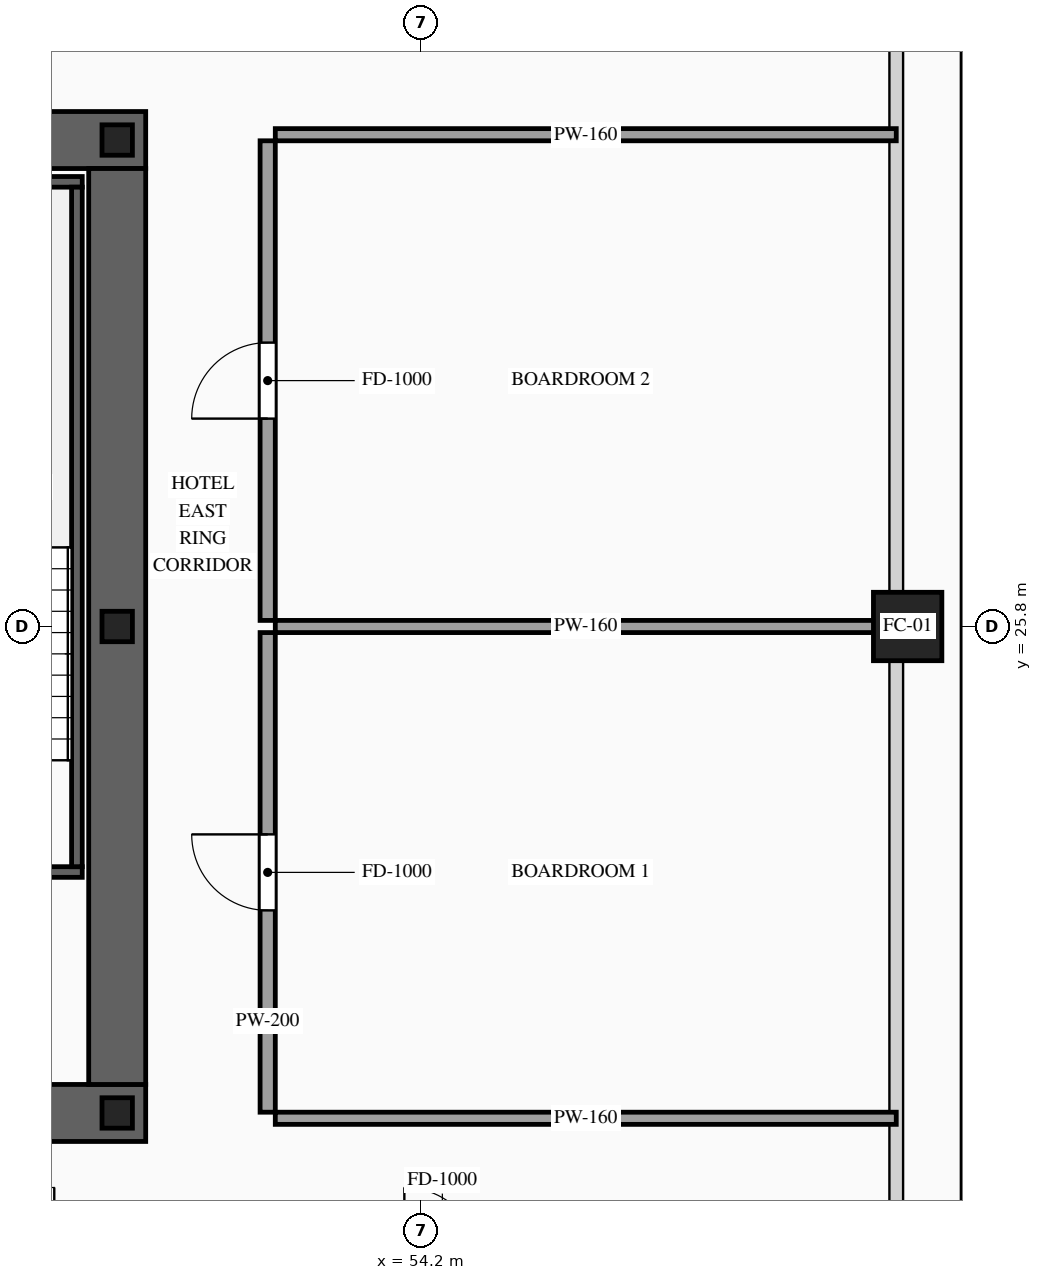
"""IFC4 building model, lengths in metres.
Left out: names, types, materials, properties, quantities, classifications, styles, units other than length and angle.
Written with IfcOpenShell. Run it as: python <this file> out.ifc"""

import sys

from ifc_helpers import new_model, si_unit, direction, frame, frame_2d, origin, origin_2d, place, context, subcontext, project, spatial, rectangle, hollow_rectangle, i_section, extrude, source, transform, mapped, element, fill, save


model = new_model("IFC4")
c1 = context("Model", 3, precision=1e-05, world=origin(), true_north=direction((0.0, 1.0)))
c2 = subcontext(c1, "Body", "Model", "MODEL_VIEW")
j1 = project(units=[si_unit("LENGTHUNIT", "METRE"), si_unit("PLANEANGLEUNIT", "RADIAN")], contexts=[c1])
p1 = place(None, origin())
s1 = spatial("IfcSite", under=j1, at=p1, CompositionType="ELEMENT")
p2 = place(p1, origin())
s2 = spatial("IfcBuilding", under=s1, at=p2, CompositionType="ELEMENT")
p3 = place(p2, frame((0.0, 0.0, 163.2)))
s3 = spatial("IfcBuildingStorey", under=s2, at=p3, CompositionType="ELEMENT", Elevation=163.2)
p4 = place(p3, frame((23.425, 19.4, 0.0), z_axis=(0.0, 0.0, 1.0), x_axis=(1.0, 0.0, 0.0)))
e1 = element("IfcWall", 1, at=p4, inside=s3, PredefinedType="SHEAR", context=c2, shape_type="SweptSolid", body=[
    extrude(rectangle(XDim=27.15, YDim=0.75, at=frame_2d((13.575, 0.0))), origin(), (0.0, 0.0, 1.0), 3.6),
])
p5 = place(p4, frame((2.025, 0.0, 0.0)))
e2 = element("IfcOpeningElement", 2, at=p5, cuts=e1, PredefinedType="OPENING", context=c2, shape_type="SweptSolid", body=[
    extrude(rectangle(XDim=1.1, YDim=2.2, at=frame_2d((0.55, 1.1))), frame((0.0, 0.39, 0.0), z_axis=(0.0, -1.0, 0.0), x_axis=(1.0, 0.0, 0.0)), (0.0, 0.0, 1.0), 0.78),
])
p6 = place(p4, frame((9.925, 0.0, 0.0)))
e3 = element("IfcOpeningElement", 3, at=p6, cuts=e1, PredefinedType="OPENING", context=c2, shape_type="SweptSolid", body=[
    extrude(rectangle(XDim=1.1, YDim=2.2, at=frame_2d((0.55, 1.1))), frame((0.0, 0.39, 0.0), z_axis=(0.0, -1.0, 0.0), x_axis=(1.0, 0.0, 0.0)), (0.0, 0.0, 1.0), 0.78),
])
p7 = place(p4, frame((23.125, 0.0, 0.0)))
e4 = element("IfcOpeningElement", 4, at=p7, cuts=e1, PredefinedType="OPENING", context=c2, shape_type="SweptSolid", body=[
    extrude(rectangle(XDim=1.1, YDim=2.2, at=frame_2d((0.55, 1.1))), frame((0.0, 0.39, 0.0), z_axis=(0.0, -1.0, 0.0), x_axis=(1.0, 0.0, 0.0)), (0.0, 0.0, 1.0), 0.78),
])
p8 = place(p4, frame((19.745, 0.0, 0.0)))
e5 = element("IfcOpeningElement", 5, at=p8, cuts=e1, PredefinedType="OPENING", context=c2, shape_type="SweptSolid", body=[
    extrude(rectangle(XDim=0.9, YDim=2.15, at=frame_2d((0.45, 1.075))), frame((0.0, 0.39, 0.0), z_axis=(0.0, -1.0, 0.0), x_axis=(1.0, 0.0, 0.0)), (0.0, 0.0, 1.0), 0.78),
])
p9 = place(p4, frame((18.305, 0.0, 0.0)))
e6 = element("IfcOpeningElement", 6, at=p9, cuts=e1, PredefinedType="OPENING", context=c2, shape_type="SweptSolid", body=[
    extrude(rectangle(XDim=0.9, YDim=2.15, at=frame_2d((0.45, 1.075))), frame((0.0, 0.39, 0.0), z_axis=(0.0, -1.0, 0.0), x_axis=(1.0, 0.0, 0.0)), (0.0, 0.0, 1.0), 0.78),
])
p10 = place(p3, frame((23.425, 32.2, 0.0), z_axis=(0.0, 0.0, 1.0), x_axis=(1.0, 0.0, 0.0)))
e7 = element("IfcWall", 7, at=p10, inside=s3, PredefinedType="SHEAR", context=c2, shape_type="SweptSolid", body=[
    extrude(rectangle(XDim=27.15, YDim=0.75, at=frame_2d((13.575, 0.0))), origin(), (0.0, 0.0, 1.0), 3.6),
])
p11 = place(p10, frame((4.645, 0.0, 0.0)))
e8 = element("IfcOpeningElement", 8, at=p11, cuts=e7, PredefinedType="OPENING", context=c2, shape_type="SweptSolid", body=[
    extrude(rectangle(XDim=0.9, YDim=2.15, at=frame_2d((0.45, 1.075))), frame((0.0, 0.39, 0.0), z_axis=(0.0, -1.0, 0.0), x_axis=(1.0, 0.0, 0.0)), (0.0, 0.0, 1.0), 0.78),
])
p12 = place(p10, frame((9.925, 0.0, 0.0)))
e9 = element("IfcOpeningElement", 9, at=p12, cuts=e7, PredefinedType="OPENING", context=c2, shape_type="SweptSolid", body=[
    extrude(rectangle(XDim=1.1, YDim=2.2, at=frame_2d((0.55, 1.1))), frame((0.0, 0.39, 0.0), z_axis=(0.0, -1.0, 0.0), x_axis=(1.0, 0.0, 0.0)), (0.0, 0.0, 1.0), 0.78),
])
p13 = place(p10, frame((15.775, 0.0, 0.0)))
e10 = element("IfcOpeningElement", 10, at=p13, cuts=e7, PredefinedType="OPENING", context=c2, shape_type="SweptSolid", body=[
    extrude(rectangle(XDim=1.1, YDim=2.2, at=frame_2d((0.55, 1.1))), frame((0.0, 0.39, 0.0), z_axis=(0.0, -1.0, 0.0), x_axis=(1.0, 0.0, 0.0)), (0.0, 0.0, 1.0), 0.78),
])
p14 = place(p10, frame((18.305, 0.0, 0.0)))
e11 = element("IfcOpeningElement", 11, at=p14, cuts=e7, PredefinedType="OPENING", context=c2, shape_type="SweptSolid", body=[
    extrude(rectangle(XDim=0.9, YDim=2.15, at=frame_2d((0.45, 1.075))), frame((0.0, 0.39, 0.0), z_axis=(0.0, -1.0, 0.0), x_axis=(1.0, 0.0, 0.0)), (0.0, 0.0, 1.0), 0.78),
])
p15 = place(p10, frame((19.745, 0.0, 0.0)))
e12 = element("IfcOpeningElement", 12, at=p15, cuts=e7, PredefinedType="OPENING", context=c2, shape_type="SweptSolid", body=[
    extrude(rectangle(XDim=0.9, YDim=2.15, at=frame_2d((0.45, 1.075))), frame((0.0, 0.39, 0.0), z_axis=(0.0, -1.0, 0.0), x_axis=(1.0, 0.0, 0.0)), (0.0, 0.0, 1.0), 0.78),
])
m1 = source(origin(), c2, "Body", "SweptSolid", [
    extrude(rectangle(XDim=12.05, YDim=0.75, at=frame_2d((6.025, 0.0))), origin(), (0.0, 0.0, 1.0), 3.6),
])
p16 = place(p3, frame((50.2, 19.775, 0.0), z_axis=(0.0, 0.0, 1.0), x_axis=(0.0, 1.0, 0.0)))
e13 = element("IfcWall", 13, at=p16, inside=s3, PredefinedType="SHEAR", context=c2, shape_type="MappedRepresentation", body=[
    mapped(m1, transform((0.0, 0.0, 0.0), scale=1.0)),
])
m2 = source(origin(), c2, "Body", "SweptSolid", [
    extrude(i_section(OverallWidth=0.4, OverallDepth=0.4, WebThickness=0.013, FlangeThickness=0.021, at=origin_2d()), origin(), (0.0, 0.0, 1.0), 3.6),
])
for number, where, z_axis, x_axis in (
    (14, (50.2, 19.4, 0.0), (0.0, 0.0, 1.0), (1.0, 0.0, 0.0)),
    (15, (50.2, 25.8, 0.0), (0.0, 0.0, 1.0), (1.0, 0.0, 0.0)),
    (16, (50.2, 32.2, 0.0), (0.0, 0.0, 1.0), (1.0, 0.0, 0.0)),
):
    element("IfcColumn", number, at=place(p3, frame(where, z_axis=z_axis, x_axis=x_axis)), inside=s3, PredefinedType="COLUMN", context=c2, shape_type="MappedRepresentation", body=[
        mapped(m2, transform((0.0, 0.0, 0.0), scale=1.0)),
    ])
m3 = source(origin(), c2, "Body", "SweptSolid", [
    extrude(hollow_rectangle(XDim=0.9, YDim=0.9, WallThickness=0.042, at=origin_2d()), origin(), (0.0, 0.0, 1.0), 3.3),
])
p17 = place(p3, frame((60.6, 25.8, 0.0), z_axis=(0.0, 0.0, 1.0), x_axis=(1.0, 0.0, 0.0)))
e17 = element("IfcColumn", 17, at=p17, inside=s3, PredefinedType="COLUMN", context=c2, shape_type="MappedRepresentation", body=[
    mapped(m3, transform((0.0, 0.0, 0.0), scale=1.0)),
])
p18 = place(p3, frame((46.46, 22.57, 0.0), z_axis=(0.0, 0.0, 1.0), x_axis=(1.0, 0.0, 0.0)))
e18 = element("IfcWall", 18, at=p18, inside=s3, PredefinedType="SOLIDWALL", context=c2, shape_type="SweptSolid", body=[
    extrude(rectangle(XDim=3.28, YDim=0.14, at=frame_2d((1.64, 0.0))), origin(), (0.0, 0.0, 1.0), 3.3),
])
p19 = place(p18, frame((1.09, 0.0, 0.0)))
e19 = element("IfcOpeningElement", 19, at=p19, cuts=e18, PredefinedType="OPENING", context=c2, shape_type="SweptSolid", body=[
    extrude(rectangle(XDim=1.1, YDim=2.2, at=frame_2d((0.55, 1.1))), frame((0.0, 0.085, 0.0), z_axis=(0.0, -1.0, 0.0), x_axis=(1.0, 0.0, 0.0)), (0.0, 0.0, 1.0), 0.17),
])
m4 = source(origin(), c2, "Body", "SweptSolid", [
    extrude(rectangle(XDim=3.28, YDim=0.14, at=frame_2d((1.64, 0.0))), origin(), (0.0, 0.0, 1.0), 3.3),
])
p20 = place(p3, frame((46.46, 31.65, 0.0), z_axis=(0.0, 0.0, 1.0), x_axis=(1.0, 0.0, 0.0)))
e20 = element("IfcWall", 20, at=p20, inside=s3, PredefinedType="SOLIDWALL", context=c2, shape_type="MappedRepresentation", body=[
    mapped(m4, transform((0.0, 0.0, 0.0), scale=1.0)),
])
m5 = source(origin(), c2, "Body", "SweptSolid", [
    extrude(rectangle(XDim=8.94, YDim=0.14, at=frame_2d((4.47, 0.0))), origin(), (0.0, 0.0, 1.0), 3.3),
])
p21 = place(p3, frame((49.67, 22.64, 0.0), z_axis=(0.0, 0.0, 1.0), x_axis=(0.0, 1.0, 0.0)))
e21 = element("IfcWall", 21, at=p21, inside=s3, PredefinedType="SOLIDWALL", context=c2, shape_type="MappedRepresentation", body=[
    mapped(m5, transform((0.0, 0.0, 0.0), scale=1.0)),
])
p22 = place(p3, frame((52.18, 19.41, 0.0), z_axis=(0.0, 0.0, 1.0), x_axis=(0.0, 1.0, 0.0)))
e22 = element("IfcWall", 22, at=p22, inside=s3, PredefinedType="PARTITIONING", context=c2, shape_type="SweptSolid", body=[
    extrude(rectangle(XDim=6.31, YDim=0.2, at=frame_2d((3.155, 0.0))), origin(), (0.0, 0.0, 1.0), 3.3),
])
p23 = place(p22, frame((2.655, 0.0, 0.0)))
e23 = element("IfcOpeningElement", 23, at=p23, cuts=e22, PredefinedType="OPENING", context=c2, shape_type="SweptSolid", body=[
    extrude(rectangle(XDim=1.0, YDim=2.2, at=frame_2d((0.5, 1.1))), frame((0.0, 0.115, 0.0), z_axis=(0.0, -1.0, 0.0), x_axis=(1.0, 0.0, 0.0)), (0.0, 0.0, 1.0), 0.23),
])
m6 = source(origin(), c2, "Body", "SweptSolid", [
    extrude(rectangle(XDim=8.17, YDim=0.16, at=frame_2d((4.085, 0.0))), origin(), (0.0, 0.0, 1.0), 1.695),
])
p24 = place(p3, frame((52.28, 25.8, 0.0), z_axis=(0.0, 0.0, 1.0), x_axis=(1.0, 0.0, 0.0)))
e24 = element("IfcWall", 24, at=p24, inside=s3, PredefinedType="PARTITIONING", context=c2, shape_type="MappedRepresentation", body=[
    mapped(m6, transform((0.0, 0.0, 0.0), scale=1.0)),
])
m7 = source(origin(), c2, "Body", "SweptSolid", [
    extrude(rectangle(XDim=8.17, YDim=0.16, at=frame_2d((4.085, 0.0))), origin(), (0.0, 0.0, 1.0), 3.3),
])
p25 = place(p3, frame((52.28, 19.33, 0.0), z_axis=(0.0, 0.0, 1.0), x_axis=(1.0, 0.0, 0.0)))
e25 = element("IfcWall", 25, at=p25, inside=s3, PredefinedType="PARTITIONING", context=c2, shape_type="MappedRepresentation", body=[
    mapped(m7, transform((0.0, 0.0, 0.0), scale=1.0)),
])
p26 = place(p3, frame((52.18, 25.88, 0.0), z_axis=(0.0, 0.0, 1.0), x_axis=(0.0, 1.0, 0.0)))
e26 = element("IfcWall", 26, at=p26, inside=s3, PredefinedType="PARTITIONING", context=c2, shape_type="SweptSolid", body=[
    extrude(rectangle(XDim=6.31, YDim=0.2, at=frame_2d((3.155, 0.0))), origin(), (0.0, 0.0, 1.0), 3.3),
])
p27 = place(p26, frame((2.655, 0.0, 0.0)))
e27 = element("IfcOpeningElement", 27, at=p27, cuts=e26, PredefinedType="OPENING", context=c2, shape_type="SweptSolid", body=[
    extrude(rectangle(XDim=1.0, YDim=2.2, at=frame_2d((0.5, 1.1))), frame((0.0, 0.115, 0.0), z_axis=(0.0, -1.0, 0.0), x_axis=(1.0, 0.0, 0.0)), (0.0, 0.0, 1.0), 0.23),
])
p28 = place(p3, frame((52.28, 32.27, 0.0), z_axis=(0.0, 0.0, 1.0), x_axis=(1.0, 0.0, 0.0)))
e28 = element("IfcWall", 28, at=p28, inside=s3, PredefinedType="PARTITIONING", context=c2, shape_type="MappedRepresentation", body=[
    mapped(m7, transform((0.0, 0.0, 0.0), scale=1.0)),
])
m8 = source(origin(), c2, "Body", "SweptSolid", [
    extrude(rectangle(XDim=1.0, YDim=2.2, at=frame_2d((0.5, 1.1))), frame((0.0, 0.025, 0.0), z_axis=(0.0, -1.0, 0.0), x_axis=(1.0, 0.0, 0.0)), (0.0, 0.0, 1.0), 0.05),
])
p29 = place(p23, origin())
e29 = element("IfcDoor", 29, at=p29, inside=s3, OperationType="SINGLE_SWING_RIGHT", PredefinedType="DOOR", context=c2, shape_type="MappedRepresentation", body=[
    mapped(m8, transform((0.0, 0.0, 0.0), scale=1.0)),
])
fill(e23, e29)
p30 = place(p27, origin())
e30 = element("IfcDoor", 30, at=p30, inside=s3, OperationType="SINGLE_SWING_LEFT", PredefinedType="DOOR", context=c2, shape_type="MappedRepresentation", body=[
    mapped(m8, transform((0.0, 0.0, 0.0), scale=1.0)),
])
fill(e27, e30)
save(model, sys.argv[1])
